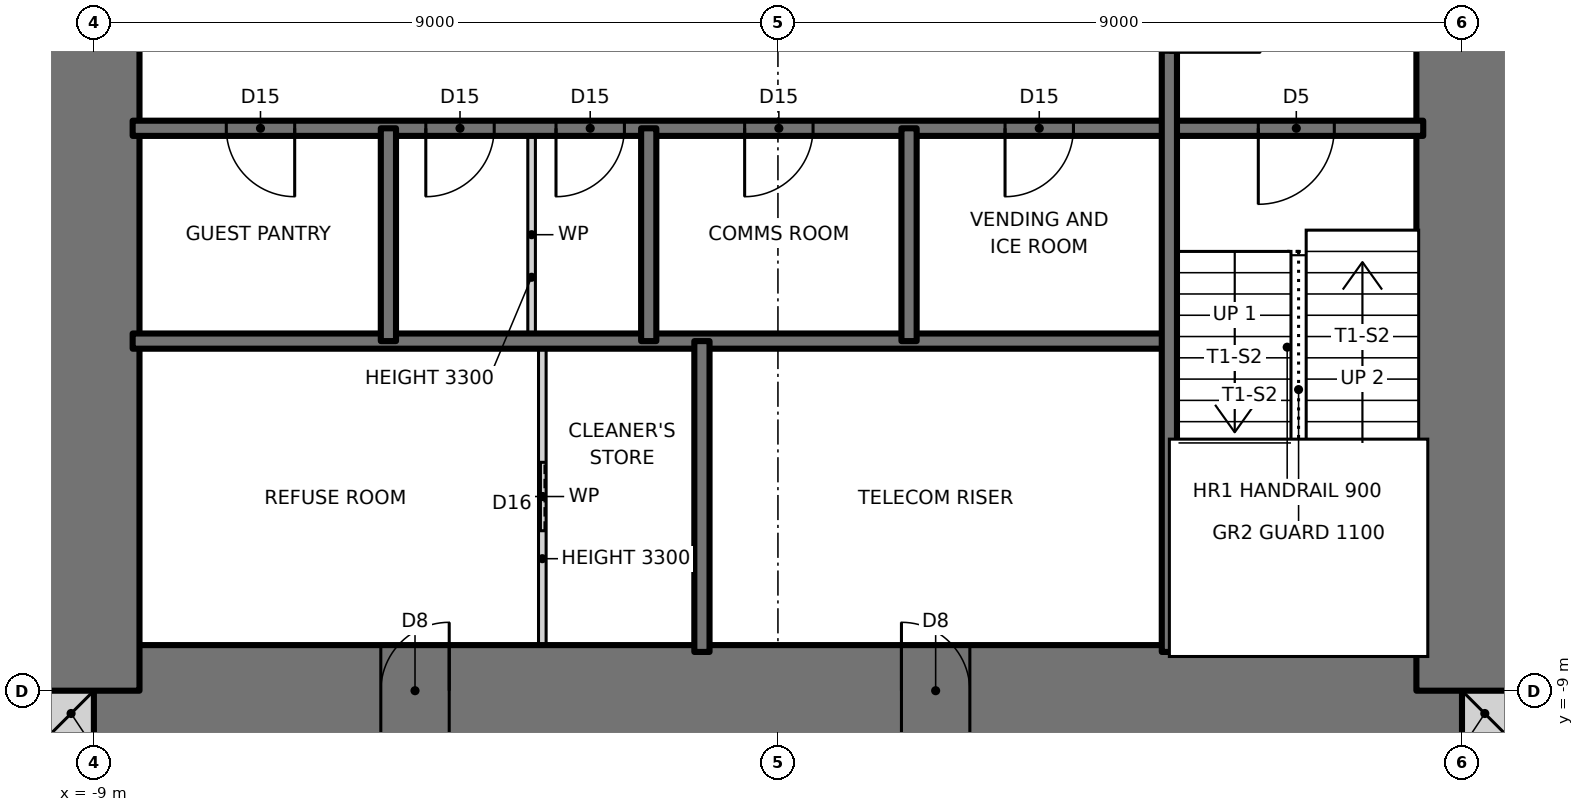
"""IFC4 building model, lengths in metres.
Left out: names, types, materials, properties, quantities, classifications, styles, units other than length and angle.
Written with IfcOpenShell. Run it as: python <this file> out.ifc"""

import sys

from ifc_helpers import new_model, si_unit, direction, frame, frame_2d, origin, place, context, subcontext, project, spatial, rectangle, extrude, element, fill, save


model = new_model("IFC4")
c1 = context("Model", 3, precision=1e-05, world=origin(), true_north=direction((0.0, 1.0)))
c2 = subcontext(c1, "Body", "Model", "MODEL_VIEW")
j1 = project(units=[si_unit("LENGTHUNIT", "METRE"), si_unit("PLANEANGLEUNIT", "RADIAN")], contexts=[c1])
p1 = place(None, origin())
s1 = spatial("IfcSite", under=j1, at=p1, CompositionType="ELEMENT")
p2 = place(p1, origin())
s2 = spatial("IfcBuilding", under=s1, at=p2, CompositionType="ELEMENT")
p3 = place(p2, frame((0.0, 0.0, 205.5)))
s3 = spatial("IfcBuildingStorey", under=s2, at=p3, CompositionType="ELEMENT", Elevation=205.5)
for number, where, z_axis, x_axis in (
    (1, (-9.6, -9.3, 0.0), (0.0, 0.0, 1.0), (1.0, 0.0, 0.0)),
    (2, (9.0, -9.3, 0.0), (0.0, 0.0, 1.0), (1.0, 0.0, 0.0)),
):
    element("IfcWall", number, at=place(p3, frame(where, z_axis=z_axis, x_axis=x_axis)), inside=s3, PredefinedType="SOLIDWALL", context=c2, shape_type="SweptSolid", body=[
        extrude(rectangle(XDim=0.6, YDim=0.6, at=frame_2d((0.3, 0.0))), origin(), (0.0, 0.0, 1.0), 3.5),
    ])
p4 = place(p3, frame((-9.0, -9.0, 0.0), z_axis=(0.0, 0.0, 1.0), x_axis=(1.0, 0.0, 0.0)))
e3 = element("IfcWall", 3, at=p4, inside=s3, PredefinedType="SHEAR", context=c2, shape_type="SweptSolid", body=[
    extrude(rectangle(XDim=18.0, YDim=1.2, at=frame_2d((9.0, 0.0))), origin(), (0.0, 0.0, 1.0), 3.5),
])
p5 = place(p4, frame((3.775, 0.0, 0.0)))
e4 = element("IfcOpeningElement", 4, at=p5, cuts=e3, PredefinedType="OPENING", context=c2, shape_type="SweptSolid", body=[
    extrude(rectangle(XDim=0.9, YDim=2.1, at=frame_2d((0.45, 1.05))), frame((0.0, 0.61, 0.0), z_axis=(0.0, -1.0, 0.0), x_axis=(1.0, 0.0, 0.0)), (0.0, 0.0, 1.0), 1.22),
])
p6 = place(p4, frame((10.625, 0.0, 0.0)))
e5 = element("IfcOpeningElement", 5, at=p6, cuts=e3, PredefinedType="OPENING", context=c2, shape_type="SweptSolid", body=[
    extrude(rectangle(XDim=0.9, YDim=2.1, at=frame_2d((0.45, 1.05))), frame((0.0, 0.61, 0.0), z_axis=(0.0, -1.0, 0.0), x_axis=(1.0, 0.0, 0.0)), (0.0, 0.0, 1.0), 1.22),
])
p7 = place(p3, frame((9.0, -9.0, 0.0), z_axis=(0.0, 0.0, 1.0), x_axis=(0.0, 1.0, 0.0)))
e6 = element("IfcWall", 6, at=p7, inside=s3, PredefinedType="SHEAR", context=c2, shape_type="SweptSolid", body=[
    extrude(rectangle(XDim=18.0, YDim=1.2, at=frame_2d((9.0, 0.0))), origin(), (0.0, 0.0, 1.0), 3.5),
])
p8 = place(p7, frame((8.5, 0.0, 0.0)))
e7 = element("IfcOpeningElement", 7, at=p8, cuts=e6, PredefinedType="OPENING", context=c2, shape_type="SweptSolid", body=[
    extrude(rectangle(XDim=1.0, YDim=2.1, at=frame_2d((0.5, 1.05))), frame((0.0, 0.61, 0.0), z_axis=(0.0, -1.0, 0.0), x_axis=(1.0, 0.0, 0.0)), (0.0, 0.0, 1.0), 1.22),
])
p9 = place(p3, frame((-9.0, 9.0, 0.0), z_axis=(0.0, 0.0, 1.0), x_axis=(0.0, -1.0, 0.0)))
e8 = element("IfcWall", 8, at=p9, inside=s3, PredefinedType="SHEAR", context=c2, shape_type="SweptSolid", body=[
    extrude(rectangle(XDim=18.0, YDim=1.2, at=frame_2d((9.0, 0.0))), origin(), (0.0, 0.0, 1.0), 3.5),
])
p10 = place(p9, frame((8.5, 0.0, 0.0)))
e9 = element("IfcOpeningElement", 9, at=p10, cuts=e8, PredefinedType="OPENING", context=c2, shape_type="SweptSolid", body=[
    extrude(rectangle(XDim=1.0, YDim=2.1, at=frame_2d((0.5, 1.05))), frame((0.0, 0.61, 0.0), z_axis=(0.0, -1.0, 0.0), x_axis=(1.0, 0.0, 0.0)), (0.0, 0.0, 1.0), 1.22),
])
p11 = place(p3, frame((-8.49, -4.4, 0.0), z_axis=(0.0, 0.0, 1.0), x_axis=(1.0, 0.0, 0.0)))
e10 = element("IfcWall", 10, at=p11, inside=s3, PredefinedType="SOLIDWALL", context=c2, shape_type="SweptSolid", body=[
    extrude(rectangle(XDim=13.64, YDim=0.2, at=frame_2d((6.82, 0.0))), origin(), (0.0, 0.0, 1.0), 3.5),
])
p12 = place(p3, frame((-8.49, -1.6, 0.0), z_axis=(0.0, 0.0, 1.0), x_axis=(1.0, 0.0, 0.0)))
e11 = element("IfcWall", 11, at=p12, inside=s3, PredefinedType="SOLIDWALL", context=c2, shape_type="SweptSolid", body=[
    extrude(rectangle(XDim=16.98, YDim=0.2, at=frame_2d((8.49, 0.0))), origin(), (0.0, 0.0, 1.0), 3.5),
])
p13 = place(p12, frame((14.81, 0.0, 0.0)))
e12 = element("IfcOpeningElement", 12, at=p13, cuts=e11, PredefinedType="OPENING", context=c2, shape_type="SweptSolid", body=[
    extrude(rectangle(XDim=1.0, YDim=2.1, at=frame_2d((0.5, 1.05))), frame((0.0, 0.11, 0.0), z_axis=(0.0, -1.0, 0.0), x_axis=(1.0, 0.0, 0.0)), (0.0, 0.0, 1.0), 0.22),
])
p14 = place(p12, frame((1.232, 0.0, 0.0)))
e13 = element("IfcOpeningElement", 13, at=p14, cuts=e11, PredefinedType="OPENING", context=c2, shape_type="SweptSolid", body=[
    extrude(rectangle(XDim=0.9, YDim=2.1, at=frame_2d((0.45, 1.05))), frame((0.0, 0.11, 0.0), z_axis=(0.0, -1.0, 0.0), x_axis=(1.0, 0.0, 0.0)), (0.0, 0.0, 1.0), 0.22),
])
p15 = place(p12, frame((5.57, 0.0, 0.0)))
e14 = element("IfcOpeningElement", 14, at=p15, cuts=e11, PredefinedType="OPENING", context=c2, shape_type="SweptSolid", body=[
    extrude(rectangle(XDim=0.9, YDim=2.1, at=frame_2d((0.45, 1.05))), frame((0.0, 0.11, 0.0), z_axis=(0.0, -1.0, 0.0), x_axis=(1.0, 0.0, 0.0)), (0.0, 0.0, 1.0), 0.22),
])
p16 = place(p12, frame((3.857, 0.0, 0.0)))
e15 = element("IfcOpeningElement", 15, at=p16, cuts=e11, PredefinedType="OPENING", context=c2, shape_type="SweptSolid", body=[
    extrude(rectangle(XDim=0.9, YDim=2.1, at=frame_2d((0.45, 1.05))), frame((0.0, 0.11, 0.0), z_axis=(0.0, -1.0, 0.0), x_axis=(1.0, 0.0, 0.0)), (0.0, 0.0, 1.0), 0.22),
])
p17 = place(p12, frame((8.052, 0.0, 0.0)))
e16 = element("IfcOpeningElement", 16, at=p17, cuts=e11, PredefinedType="OPENING", context=c2, shape_type="SweptSolid", body=[
    extrude(rectangle(XDim=0.9, YDim=2.1, at=frame_2d((0.45, 1.05))), frame((0.0, 0.11, 0.0), z_axis=(0.0, -1.0, 0.0), x_axis=(1.0, 0.0, 0.0)), (0.0, 0.0, 1.0), 0.22),
])
p18 = place(p12, frame((11.478, 0.0, 0.0)))
e17 = element("IfcOpeningElement", 17, at=p18, cuts=e11, PredefinedType="OPENING", context=c2, shape_type="SweptSolid", body=[
    extrude(rectangle(XDim=0.9, YDim=2.1, at=frame_2d((0.45, 1.05))), frame((0.0, 0.11, 0.0), z_axis=(0.0, -1.0, 0.0), x_axis=(1.0, 0.0, 0.0)), (0.0, 0.0, 1.0), 0.22),
])
p19 = place(p3, frame((5.15, -8.49, 0.0), z_axis=(0.0, 0.0, 1.0), x_axis=(0.0, 1.0, 0.0)))
e18 = element("IfcWall", 18, at=p19, inside=s3, PredefinedType="SOLIDWALL", context=c2, shape_type="SweptSolid", body=[
    extrude(rectangle(XDim=13.09, YDim=0.2, at=frame_2d((6.545, 0.0))), origin(), (0.0, 0.0, 1.0), 3.5),
])
p20 = place(p19, frame((7.89, 0.0, 0.0)))
e19 = element("IfcOpeningElement", 19, at=p20, cuts=e18, PredefinedType="OPENING", context=c2, shape_type="SweptSolid", body=[
    extrude(rectangle(XDim=1.2, YDim=2.1, at=frame_2d((0.6, 1.05))), frame((0.0, 0.11, 0.0), z_axis=(0.0, -1.0, 0.0), x_axis=(1.0, 0.0, 0.0)), (0.0, 0.0, 1.0), 0.22),
])
p21 = place(p3, frame((1.725, -4.4, 0.0), z_axis=(0.0, 0.0, 1.0), x_axis=(0.0, 1.0, 0.0)))
e20 = element("IfcWall", 20, at=p21, inside=s3, PredefinedType="SOLIDWALL", context=c2, shape_type="SweptSolid", body=[
    extrude(rectangle(XDim=2.8, YDim=0.2, at=frame_2d((1.4, 0.0))), origin(), (0.0, 0.0, 1.0), 3.5),
])
p22 = place(p3, frame((-1.0, -8.49, 0.0), z_axis=(0.0, 0.0, 1.0), x_axis=(0.0, 1.0, 0.0)))
e21 = element("IfcWall", 21, at=p22, inside=s3, PredefinedType="SOLIDWALL", context=c2, shape_type="SweptSolid", body=[
    extrude(rectangle(XDim=4.09, YDim=0.2, at=frame_2d((2.045, 0.0))), origin(), (0.0, 0.0, 1.0), 3.5),
])
p23 = place(p3, frame((-1.7, -4.4, 0.0), z_axis=(0.0, 0.0, 1.0), x_axis=(0.0, 1.0, 0.0)))
e22 = element("IfcWall", 22, at=p23, inside=s3, PredefinedType="SOLIDWALL", context=c2, shape_type="SweptSolid", body=[
    extrude(rectangle(XDim=2.8, YDim=0.2, at=frame_2d((1.4, 0.0))), origin(), (0.0, 0.0, 1.0), 3.5),
])
p24 = place(p3, frame((-3.1, -8.49, 0.0), z_axis=(0.0, 0.0, 1.0), x_axis=(0.0, 1.0, 0.0)))
e23 = element("IfcWall", 23, at=p24, inside=s3, PredefinedType="PARTITIONING", context=c2, shape_type="SweptSolid", body=[
    extrude(rectangle(XDim=4.09, YDim=0.1, at=frame_2d((2.045, 0.0))), origin(), (0.0, 0.0, 1.0), 3.3),
])
p25 = place(p24, frame((1.595, 0.0, 0.0)))
e24 = element("IfcOpeningElement", 24, at=p25, cuts=e23, PredefinedType="OPENING", context=c2, shape_type="SweptSolid", body=[
    extrude(rectangle(XDim=0.9, YDim=2.1, at=frame_2d((0.45, 1.05))), frame((0.0, 0.06, 0.0), z_axis=(0.0, -1.0, 0.0), x_axis=(1.0, 0.0, 0.0)), (0.0, 0.0, 1.0), 0.12),
])
p26 = place(p3, frame((-3.241, -4.4, 0.0), z_axis=(0.0, 0.0, 1.0), x_axis=(0.0, 1.0, 0.0)))
e25 = element("IfcWall", 25, at=p26, inside=s3, PredefinedType="PARTITIONING", context=c2, shape_type="SweptSolid", body=[
    extrude(rectangle(XDim=2.8, YDim=0.1, at=frame_2d((1.4, 0.0))), origin(), (0.0, 0.0, 1.0), 3.3),
])
p27 = place(p3, frame((-5.125, -4.4, 0.0), z_axis=(0.0, 0.0, 1.0), x_axis=(0.0, 1.0, 0.0)))
e26 = element("IfcWall", 26, at=p27, inside=s3, PredefinedType="SOLIDWALL", context=c2, shape_type="SweptSolid", body=[
    extrude(rectangle(XDim=2.8, YDim=0.2, at=frame_2d((1.4, 0.0))), origin(), (0.0, 0.0, 1.0), 3.5),
])
p28 = place(p13, frame((1.0, 0.0, 0.0), z_axis=(0.0, 0.0, 1.0), x_axis=(-1.0, 0.0, 0.0)))
e27 = element("IfcDoor", 27, at=p28, inside=s3, OperationType="SINGLE_SWING_RIGHT", PredefinedType="DOOR", context=c2, shape_type="SweptSolid", body=[
    extrude(rectangle(XDim=1.0, YDim=2.1, at=frame_2d((0.5, 1.05))), frame((0.0, 0.025, 0.0), z_axis=(0.0, -1.0, 0.0), x_axis=(1.0, 0.0, 0.0)), (0.0, 0.0, 1.0), 0.05),
])
fill(e12, e27)
p29 = place(p20, frame((1.2, 0.0, 0.0), z_axis=(0.0, 0.0, 1.0), x_axis=(-1.0, 0.0, 0.0)))
e28 = element("IfcDoor", 28, at=p29, inside=s3, OperationType="SINGLE_SWING_RIGHT", PredefinedType="DOOR", context=c2, shape_type="SweptSolid", body=[
    extrude(rectangle(XDim=1.2, YDim=2.1, at=frame_2d((0.6, 1.05))), frame((0.0, 0.025, 0.0), z_axis=(0.0, -1.0, 0.0), x_axis=(1.0, 0.0, 0.0)), (0.0, 0.0, 1.0), 0.05),
])
fill(e19, e28)
p30 = place(p14, frame((0.9, 0.0, 0.0), z_axis=(0.0, 0.0, 1.0), x_axis=(-1.0, 0.0, 0.0)))
e29 = element("IfcDoor", 29, at=p30, inside=s3, OperationType="SINGLE_SWING_LEFT", PredefinedType="DOOR", context=c2, shape_type="SweptSolid", body=[
    extrude(rectangle(XDim=0.9, YDim=2.1, at=frame_2d((0.45, 1.05))), frame((0.0, 0.025, 0.0), z_axis=(0.0, -1.0, 0.0), x_axis=(1.0, 0.0, 0.0)), (0.0, 0.0, 1.0), 0.05),
])
fill(e13, e29)
p31 = place(p15, frame((0.9, 0.0, 0.0), z_axis=(0.0, 0.0, 1.0), x_axis=(-1.0, 0.0, 0.0)))
e30 = element("IfcDoor", 30, at=p31, inside=s3, OperationType="SINGLE_SWING_RIGHT", PredefinedType="DOOR", context=c2, shape_type="SweptSolid", body=[
    extrude(rectangle(XDim=0.9, YDim=2.1, at=frame_2d((0.45, 1.05))), frame((0.0, 0.025, 0.0), z_axis=(0.0, -1.0, 0.0), x_axis=(1.0, 0.0, 0.0)), (0.0, 0.0, 1.0), 0.05),
])
fill(e14, e30)
p32 = place(p16, frame((0.9, 0.0, 0.0), z_axis=(0.0, 0.0, 1.0), x_axis=(-1.0, 0.0, 0.0)))
e31 = element("IfcDoor", 31, at=p32, inside=s3, OperationType="SINGLE_SWING_RIGHT", PredefinedType="DOOR", context=c2, shape_type="SweptSolid", body=[
    extrude(rectangle(XDim=0.9, YDim=2.1, at=frame_2d((0.45, 1.05))), frame((0.0, 0.025, 0.0), z_axis=(0.0, -1.0, 0.0), x_axis=(1.0, 0.0, 0.0)), (0.0, 0.0, 1.0), 0.05),
])
fill(e15, e31)
p33 = place(p17, frame((0.9, 0.0, 0.0), z_axis=(0.0, 0.0, 1.0), x_axis=(-1.0, 0.0, 0.0)))
e32 = element("IfcDoor", 32, at=p33, inside=s3, OperationType="SINGLE_SWING_RIGHT", PredefinedType="DOOR", context=c2, shape_type="SweptSolid", body=[
    extrude(rectangle(XDim=0.9, YDim=2.1, at=frame_2d((0.45, 1.05))), frame((0.0, 0.025, 0.0), z_axis=(0.0, -1.0, 0.0), x_axis=(1.0, 0.0, 0.0)), (0.0, 0.0, 1.0), 0.05),
])
fill(e16, e32)
p34 = place(p18, frame((0.9, 0.0, 0.0), z_axis=(0.0, 0.0, 1.0), x_axis=(-1.0, 0.0, 0.0)))
e33 = element("IfcDoor", 33, at=p34, inside=s3, OperationType="SINGLE_SWING_RIGHT", PredefinedType="DOOR", context=c2, shape_type="SweptSolid", body=[
    extrude(rectangle(XDim=0.9, YDim=2.1, at=frame_2d((0.45, 1.05))), frame((0.0, 0.025, 0.0), z_axis=(0.0, -1.0, 0.0), x_axis=(1.0, 0.0, 0.0)), (0.0, 0.0, 1.0), 0.05),
])
fill(e17, e33)
p35 = place(p25, origin())
e34 = element("IfcDoor", 34, at=p35, inside=s3, OperationType="SLIDING_TO_LEFT", PredefinedType="DOOR", context=c2, shape_type="SweptSolid", body=[
    extrude(rectangle(XDim=0.9, YDim=2.1, at=frame_2d((0.45, 1.05))), frame((0.0, 0.025, 0.0), z_axis=(0.0, -1.0, 0.0), x_axis=(1.0, 0.0, 0.0)), (0.0, 0.0, 1.0), 0.05),
])
fill(e24, e34)
p36 = place(p5, origin())
e35 = element("IfcDoor", 35, at=p36, inside=s3, OperationType="SINGLE_SWING_RIGHT", PredefinedType="DOOR", context=c2, shape_type="SweptSolid", body=[
    extrude(rectangle(XDim=0.9, YDim=2.1, at=frame_2d((0.45, 1.05))), frame((0.0, 0.025, 0.0), z_axis=(0.0, -1.0, 0.0), x_axis=(1.0, 0.0, 0.0)), (0.0, 0.0, 1.0), 0.05),
])
fill(e4, e35)
p37 = place(p6, origin())
e36 = element("IfcDoor", 36, at=p37, inside=s3, OperationType="SINGLE_SWING_LEFT", PredefinedType="DOOR", context=c2, shape_type="SweptSolid", body=[
    extrude(rectangle(XDim=0.9, YDim=2.1, at=frame_2d((0.45, 1.05))), frame((0.0, 0.025, 0.0), z_axis=(0.0, -1.0, 0.0), x_axis=(1.0, 0.0, 0.0)), (0.0, 0.0, 1.0), 0.05),
])
fill(e5, e36)
save(model, sys.argv[1])
